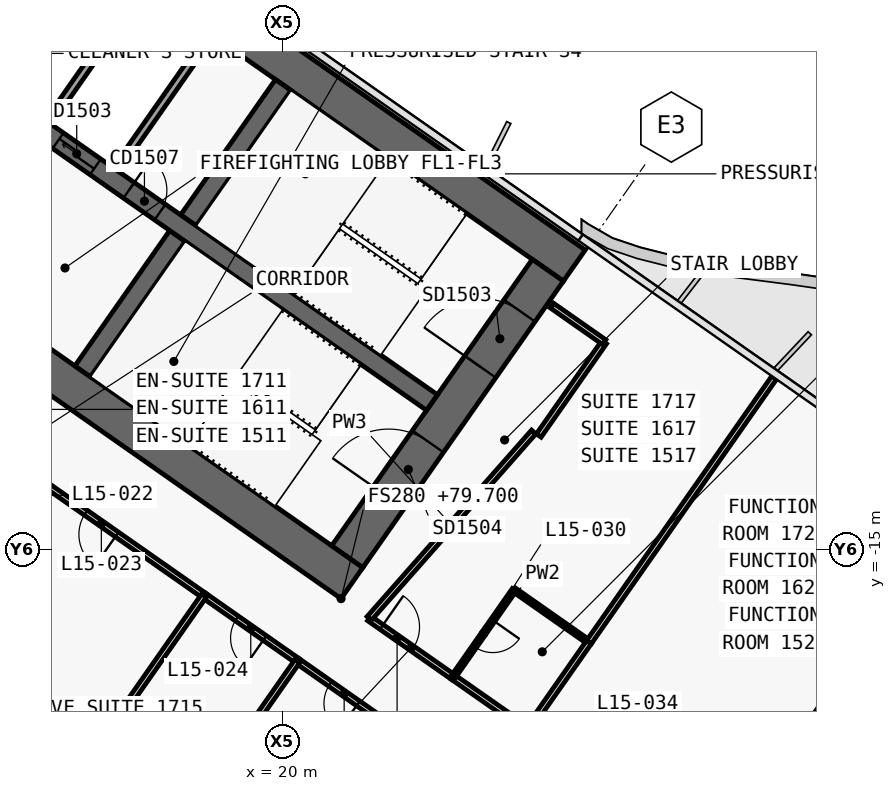
"""IFC4 building model, lengths in metres.
Left out: names, types, materials, properties, quantities, classifications, styles, units other than length and angle.
Written with IfcOpenShell. Run it as: python <this file> out.ifc"""

import sys

from ifc_helpers import new_model, si_unit, direction, frame, frame_2d, origin, place, context, subcontext, project, spatial, polyline, rectangle, outline, extrude, element, fill, save


model = new_model("IFC4")
c1 = context("Model", 3, precision=1e-05, world=origin(), true_north=direction((0.0, 1.0)))
c2 = subcontext(c1, "Body", "Model", "MODEL_VIEW")
j1 = project(units=[si_unit("LENGTHUNIT", "METRE"), si_unit("PLANEANGLEUNIT", "RADIAN")], contexts=[c1])
p1 = place(None, origin())
s1 = spatial("IfcSite", under=j1, at=p1, CompositionType="ELEMENT")
p2 = place(p1, origin())
s2 = spatial("IfcBuilding", under=s1, at=p2, CompositionType="ELEMENT")
p3 = place(p2, frame((0.0, 0.0, 79.7)))
s3 = spatial("IfcBuildingStorey", under=s2, at=p3, CompositionType="ELEMENT", Elevation=79.7)
p4 = place(p3, frame((-0.037, 11.867, 0.0), z_axis=(0.0, 0.0, 1.0), x_axis=(0.819155306259, -0.573571777746, 0.0)))
e1 = element("IfcWall", 1, at=p4, inside=s3, PredefinedType="SHEAR", context=c2, shape_type="SweptSolid", body=[
    extrude(outline(polyline([(33.837, 0.5), (0.0, 0.5), (0.7, -0.5), (33.837, -0.5), (33.837, 0.5)])), origin(), (0.0, 0.0, 1.0), 3.6),
])
p5 = place(p3, frame((-0.037, -0.585, 0.0), z_axis=(0.0, 0.0, 1.0), x_axis=(0.819157152511, -0.573569140985, 0.0)))
e2 = element("IfcWall", 2, at=p5, inside=s3, PredefinedType="SHEAR", context=c2, shape_type="SweptSolid", body=[
    extrude(outline(polyline([(26.695, 0.5), (0.0, 0.5), (0.7, -0.5), (26.695, -0.5), (26.695, 0.5)])), origin(), (0.0, 0.0, 1.0), 3.6),
])
p6 = place(p5, frame((1.245, 0.0, 0.0)))
e3 = element("IfcOpeningElement", 3, at=p6, cuts=e2, PredefinedType="OPENING", context=c2, shape_type="SweptSolid", body=[
    extrude(rectangle(XDim=1.5, YDim=2.1, at=frame_2d((0.75, 1.05))), frame((0.0, 0.51, 0.0), z_axis=(0.0, -1.0, 0.0), x_axis=(1.0, 0.0, 0.0)), (0.0, 0.0, 1.0), 1.02),
])
p7 = place(p5, frame((12.445, 0.0, 0.0)))
e4 = element("IfcOpeningElement", 4, at=p7, cuts=e2, PredefinedType="OPENING", context=c2, shape_type="SweptSolid", body=[
    extrude(rectangle(XDim=1.5, YDim=2.1, at=frame_2d((0.75, 1.05))), frame((0.0, 0.51, 0.0), z_axis=(0.0, -1.0, 0.0), x_axis=(1.0, 0.0, 0.0)), (0.0, 0.0, 1.0), 1.02),
])
p8 = place(p3, frame((21.708, -15.2, 0.0), z_axis=(0.0, 0.0, 1.0), x_axis=(0.573576324356, 0.819152122709, 0.0)))
e5 = element("IfcWall", 5, at=p8, inside=s3, PredefinedType="SHEAR", context=c2, shape_type="SweptSolid", body=[
    extrude(outline(polyline([(9.2, 0.5), (0.0, 0.5), (0.0, -0.5), (9.2, -0.5), (9.2, 0.5)])), origin(), (0.0, 0.0, 1.0), 3.6),
])
p9 = place(p8, frame((6.1, 0.0, 0.0)))
e6 = element("IfcOpeningElement", 6, at=p9, cuts=e5, PredefinedType="OPENING", context=c2, shape_type="SweptSolid", body=[
    extrude(rectangle(XDim=1.8, YDim=2.1, at=frame_2d((0.9, 1.05))), frame((0.0, 0.51, 0.0), z_axis=(0.0, -1.0, 0.0), x_axis=(1.0, 0.0, 0.0)), (0.0, 0.0, 1.0), 1.02),
])
p10 = place(p8, frame((1.9, 0.0, 0.0)))
e7 = element("IfcOpeningElement", 7, at=p10, cuts=e5, PredefinedType="OPENING", context=c2, shape_type="SweptSolid", body=[
    extrude(rectangle(XDim=1.8, YDim=2.1, at=frame_2d((0.9, 1.05))), frame((0.0, 0.51, 0.0), z_axis=(0.0, -1.0, 0.0), x_axis=(1.0, 0.0, 0.0)), (0.0, 0.0, 1.0), 1.02),
])
p11 = place(p3, frame((14.745, -10.324, 0.0), z_axis=(0.0, 0.0, 1.0), x_axis=(0.57356780395, 0.819158088694, 0.0)))
e8 = element("IfcWall", 8, at=p11, inside=s3, PredefinedType="SHEAR", context=c2, shape_type="SweptSolid", body=[
    extrude(outline(polyline([(0.0, 0.25), (0.0, -0.25), (4.35, -0.25), (4.35, 0.25), (0.0, 0.25)])), origin(), (0.0, 0.0, 1.0), 3.6),
])
p12 = place(p3, frame((17.527, -6.352, 0.0), z_axis=(0.0, 0.0, 1.0), x_axis=(0.573530143085, 0.819184457233, 0.0)))
e9 = element("IfcWall", 9, at=p12, inside=s3, PredefinedType="SHEAR", context=c2, shape_type="SweptSolid", body=[
    extrude(outline(polyline([(4.35, -0.25), (4.35, 0.25), (0.0, 0.25), (0.0, -0.25), (4.35, -0.25)])), origin(), (0.0, 0.0, 1.0), 3.6),
])
p13 = place(p3, frame((2.638, 3.768, 0.0), z_axis=(0.0, 0.0, 1.0), x_axis=(0.819148977158, -0.573580816643, 0.0)))
e10 = element("IfcWall", 10, at=p13, inside=s3, PredefinedType="SHEAR", context=c2, shape_type="SweptSolid", body=[
    extrude(outline(polyline([(0.0, 0.25), (0.0, -0.25), (26.0, -0.25), (26.0, 0.25), (0.0, 0.25)])), origin(), (0.0, 0.0, 1.0), 3.6),
])
p14 = place(p13, frame((9.637, 0.0, 0.0)))
e11 = element("IfcOpeningElement", 11, at=p14, cuts=e10, PredefinedType="OPENING", context=c2, shape_type="SweptSolid", body=[
    extrude(rectangle(XDim=1.2, YDim=2.1, at=frame_2d((0.6, 1.05))), frame((0.0, 0.26, 0.0), z_axis=(0.0, -1.0, 0.0), x_axis=(1.0, 0.0, 0.0)), (0.0, 0.0, 1.0), 0.52),
])
p15 = place(p13, frame((11.812, 0.0, 0.0)))
e12 = element("IfcOpeningElement", 12, at=p15, cuts=e10, PredefinedType="OPENING", context=c2, shape_type="SweptSolid", body=[
    extrude(rectangle(XDim=1.2, YDim=2.1, at=frame_2d((0.6, 1.05))), frame((0.0, 0.26, 0.0), z_axis=(0.0, -1.0, 0.0), x_axis=(1.0, 0.0, 0.0)), (0.0, 0.0, 1.0), 0.52),
])
p16 = place(p13, frame((13.988, 0.0, 0.0)))
e13 = element("IfcOpeningElement", 13, at=p16, cuts=e10, PredefinedType="OPENING", context=c2, shape_type="SweptSolid", body=[
    extrude(rectangle(XDim=1.2, YDim=2.1, at=frame_2d((0.6, 1.05))), frame((0.0, 0.26, 0.0), z_axis=(0.0, -1.0, 0.0), x_axis=(1.0, 0.0, 0.0)), (0.0, 0.0, 1.0), 0.52),
])
p17 = place(p13, frame((16.262, 0.0, 0.0)))
e14 = element("IfcOpeningElement", 14, at=p17, cuts=e10, PredefinedType="OPENING", context=c2, shape_type="SweptSolid", body=[
    extrude(rectangle(XDim=1.0, YDim=2.1, at=frame_2d((0.5, 1.05))), frame((0.0, 0.26, 0.0), z_axis=(0.0, -1.0, 0.0), x_axis=(1.0, 0.0, 0.0)), (0.0, 0.0, 1.0), 0.52),
])
p18 = place(p3, frame((12.059, -2.523, 0.0), z_axis=(0.0, 0.0, 1.0), x_axis=(0.573594173421, 0.819139624372, 0.0)))
e15 = element("IfcWall", 15, at=p18, inside=s3, PredefinedType="SOLIDWALL", context=c2, shape_type="SweptSolid", body=[
    extrude(rectangle(XDim=4.35, YDim=0.2, at=frame_2d((2.175, 0.0))), origin(), (0.0, 0.0, 1.0), 3.6),
])
p19 = place(p3, frame((13.84, -3.771, 0.0), z_axis=(0.0, 0.0, 1.0), x_axis=(0.57356780395, 0.819158088694, 0.0)))
e16 = element("IfcWall", 16, at=p19, inside=s3, PredefinedType="SOLIDWALL", context=c2, shape_type="SweptSolid", body=[
    extrude(rectangle(XDim=4.35, YDim=0.2, at=frame_2d((2.175, 0.0))), origin(), (0.0, 0.0, 1.0), 3.6),
])
p20 = place(p3, frame((15.622, -5.018, 0.0), z_axis=(0.0, 0.0, 1.0), x_axis=(0.573594173421, 0.819139624372, 0.0)))
e17 = element("IfcWall", 17, at=p20, inside=s3, PredefinedType="SOLIDWALL", context=c2, shape_type="SweptSolid", body=[
    extrude(rectangle(XDim=4.35, YDim=0.2, at=frame_2d((2.175, 0.0))), origin(), (0.0, 0.0, 1.0), 3.6),
])
p21 = place(p3, frame((22.284, -16.824, 0.0), z_axis=(0.0, 0.0, 1.0), x_axis=(0.819176640776, -0.573541307325, 0.0)))
e18 = element("IfcWall", 18, at=p21, inside=s3, PredefinedType="PARTITIONING", context=c2, shape_type="SweptSolid", body=[
    extrude(rectangle(XDim=2.698, YDim=0.15, at=frame_2d((1.349, 0.0))), origin(), (0.0, 0.0, 1.0), 3.32),
])
p22 = place(p21, frame((0.396, 0.0, 0.0)))
e19 = element("IfcOpeningElement", 19, at=p22, cuts=e18, PredefinedType="OPENING", context=c2, shape_type="SweptSolid", body=[
    extrude(rectangle(XDim=1.0, YDim=2.1, at=frame_2d((0.5, 1.05))), frame((0.0, 0.085, 0.0), z_axis=(0.0, -1.0, 0.0), x_axis=(1.0, 0.0, 0.0)), (0.0, 0.0, 1.0), 0.17),
])
p23 = place(p3, frame((24.491, -18.369, 0.0), z_axis=(0.0, 0.0, 1.0), x_axis=(0.819179439794, -0.573537309527, 0.0)))
e20 = element("IfcWall", 20, at=p23, inside=s3, PredefinedType="PARTITIONING", context=c2, shape_type="SweptSolid", body=[
    extrude(rectangle(XDim=2.404, YDim=0.15, at=frame_2d((1.202, 0.0))), origin(), (0.0, 0.0, 1.0), 3.32),
])
p24 = place(p3, frame((17.941, -16.224, 0.0), z_axis=(0.0, 0.0, 1.0), x_axis=(-0.819153746897, 0.573574004767, 0.0)))
e21 = element("IfcWall", 21, at=p24, inside=s3, PredefinedType="PARTITIONING", context=c2, shape_type="SweptSolid", body=[
    extrude(rectangle(XDim=6.603, YDim=0.15, at=frame_2d((3.302, 0.0))), origin(), (0.0, 0.0, 1.0), 2.6),
])
p25 = place(p24, frame((2.802, 0.0, 0.0)))
e22 = element("IfcOpeningElement", 22, at=p25, cuts=e21, PredefinedType="OPENING", context=c2, shape_type="SweptSolid", body=[
    extrude(rectangle(XDim=1.0, YDim=2.1, at=frame_2d((0.5, 1.05))), frame((0.0, 0.085, 0.0), z_axis=(0.0, -1.0, 0.0), x_axis=(1.0, 0.0, 0.0)), (0.0, 0.0, 1.0), 0.17),
])
p26 = place(p3, frame((20.398, -17.945, 0.0), z_axis=(0.0, 0.0, 1.0), x_axis=(-0.819128818764, 0.573609604409, 0.0)))
e23 = element("IfcWall", 23, at=p26, inside=s3, PredefinedType="PARTITIONING", context=c2, shape_type="SweptSolid", body=[
    extrude(rectangle(XDim=3.004, YDim=0.15, at=frame_2d((1.502, 0.0))), origin(), (0.0, 0.0, 1.0), 2.6),
])
p27 = place(p26, frame((1.052, 0.0, 0.0)))
e24 = element("IfcOpeningElement", 24, at=p27, cuts=e23, PredefinedType="OPENING", context=c2, shape_type="SweptSolid", body=[
    extrude(rectangle(XDim=0.9, YDim=2.1, at=frame_2d((0.45, 1.05))), frame((0.0, 0.085, 0.0), z_axis=(0.0, -1.0, 0.0), x_axis=(1.0, 0.0, 0.0)), (0.0, 0.0, 1.0), 0.17),
])
p28 = place(p3, frame((22.855, -19.666, 0.0), z_axis=(0.0, 0.0, 1.0), x_axis=(-0.819128818764, 0.573609604409, 0.0)))
e25 = element("IfcWall", 25, at=p28, inside=s3, PredefinedType="PARTITIONING", context=c2, shape_type="SweptSolid", body=[
    extrude(rectangle(XDim=3.004, YDim=0.15, at=frame_2d((1.502, 0.0))), origin(), (0.0, 0.0, 1.0), 2.6),
])
p29 = place(p28, frame((1.052, 0.0, 0.0)))
e26 = element("IfcOpeningElement", 26, at=p29, cuts=e25, PredefinedType="OPENING", context=c2, shape_type="SweptSolid", body=[
    extrude(rectangle(XDim=0.9, YDim=2.1, at=frame_2d((0.45, 1.05))), frame((0.0, 0.085, 0.0), z_axis=(0.0, -1.0, 0.0), x_axis=(1.0, 0.0, 0.0)), (0.0, 0.0, 1.0), 0.17),
])
p30 = place(p3, frame((26.098, -16.076, 0.0), z_axis=(0.0, 0.0, 1.0), x_axis=(-0.573550118428, -0.819170471667, 0.0)))
e27 = element("IfcWall", 27, at=p30, inside=s3, PredefinedType="PARTITIONING", context=c2, shape_type="SweptSolid", body=[
    extrude(rectangle(XDim=2.8, YDim=0.12, at=frame_2d((1.4, 0.0))), origin(), (0.0, 0.0, 1.0), 2.6),
])
p31 = place(p30, frame((0.975, 0.0, 0.0)))
e28 = element("IfcOpeningElement", 28, at=p31, cuts=e27, PredefinedType="OPENING", context=c2, shape_type="SweptSolid", body=[
    extrude(rectangle(XDim=0.85, YDim=2.05, at=frame_2d((0.425, 1.025))), frame((0.0, 0.07, 0.0), z_axis=(0.0, -1.0, 0.0), x_axis=(1.0, 0.0, 0.0)), (0.0, 0.0, 1.0), 0.14),
])
p32 = place(p3, frame((28.065, -17.453, 0.0), z_axis=(0.0, 0.0, 1.0), x_axis=(-0.819155442668, 0.573571582932, 0.0)))
e29 = element("IfcWall", 29, at=p32, inside=s3, PredefinedType="PARTITIONING", context=c2, shape_type="SweptSolid", body=[
    extrude(rectangle(XDim=2.4, YDim=0.12, at=frame_2d((1.2, 0.0))), origin(), (0.0, 0.0, 1.0), 3.32),
])
p33 = place(p3, frame((32.94, -10.491, 0.0), z_axis=(0.0, 0.0, 1.0), x_axis=(-0.573593433868, -0.819140142237, 0.0)))
e30 = element("IfcWall", 30, at=p33, inside=s3, PredefinedType="PARTITIONING", context=c2, shape_type="SweptSolid", body=[
    extrude(rectangle(XDim=8.499, YDim=0.15, at=frame_2d((4.25, 0.0))), origin(), (0.0, 0.0, 1.0), 2.6),
])
p34 = place(p3, frame((22.285, -16.825, 0.0), z_axis=(0.0, 0.0, 1.0), x_axis=(0.661551268245, 0.749899939647, 0.0)))
e31 = element("IfcWall", 31, at=p34, inside=s3, PredefinedType="PARTITIONING", context=c2, shape_type="SweptSolid", body=[
    extrude(rectangle(XDim=6.541, YDim=0.15, at=frame_2d((3.271, 0.0))), origin(), (0.0, 0.0, 1.0), 2.6),
])
p35 = place(p3, frame((26.746, -12.014, 0.0), z_axis=(0.0, 0.0, 1.0), x_axis=(0.573560650686, 0.819163097304, 0.0)))
e32 = element("IfcWall", 32, at=p35, inside=s3, PredefinedType="PARTITIONING", context=c2, shape_type="SweptSolid", body=[
    extrude(rectangle(XDim=3.0, YDim=0.15, at=frame_2d((1.5, 0.0))), origin(), (0.0, 0.0, 1.0), 3.32),
])
p36 = place(p3, frame((28.467, -9.556, 0.0), z_axis=(0.0, 0.0, 1.0), x_axis=(-0.819109000826, 0.573637903879, 0.0)))
e33 = element("IfcWall", 33, at=p36, inside=s3, PredefinedType="PARTITIONING", context=c2, shape_type="SweptSolid", body=[
    extrude(rectangle(XDim=1.68, YDim=0.15, at=frame_2d((0.84, 0.0))), origin(), (0.0, 0.0, 1.0), 3.32),
])
p37 = place(p3, frame((28.064, -17.454, 0.0), z_axis=(0.0, 0.0, 1.0), x_axis=(-0.573550118428, -0.819170471667, 0.0)))
e34 = element("IfcWall", 34, at=p37, inside=s3, PredefinedType="PARTITIONING", context=c2, shape_type="SweptSolid", body=[
    extrude(rectangle(XDim=2.8, YDim=0.15, at=frame_2d((1.4, 0.0))), origin(), (0.0, 0.0, 1.0), 2.6),
])
p38 = place(p3, frame((37.855, -13.932, 0.0), z_axis=(0.0, 0.0, 1.0), x_axis=(-0.573571089604, -0.819155788095, 0.0)))
e35 = element("IfcWall", 35, at=p38, inside=s3, PredefinedType="PARTITIONING", context=c2, shape_type="SweptSolid", body=[
    extrude(rectangle(XDim=11.3, YDim=0.15, at=frame_2d((5.65, 0.0))), origin(), (0.0, 0.0, 1.0), 2.5),
])
p39 = place(p3, frame((17.939, -16.223, 0.0), z_axis=(0.0, 0.0, 1.0), x_axis=(-0.573594765376, -0.819139209862, 0.0)))
e36 = element("IfcWall", 36, at=p39, inside=s3, PredefinedType="PARTITIONING", context=c2, shape_type="SweptSolid", body=[
    extrude(rectangle(XDim=7.3, YDim=0.15, at=frame_2d((3.65, 0.0))), origin(), (0.0, 0.0, 1.0), 2.5),
])
p40 = place(p3, frame((20.396, -17.944, 0.0), z_axis=(0.0, 0.0, 1.0), x_axis=(-0.57359826181, -0.819136761505, 0.0)))
e37 = element("IfcWall", 37, at=p40, inside=s3, PredefinedType="PARTITIONING", context=c2, shape_type="SweptSolid", body=[
    extrude(rectangle(XDim=6.63, YDim=0.15, at=frame_2d((3.315, 0.0))), origin(), (0.0, 0.0, 1.0), 2.6),
])
p41 = place(p16, origin())
e38 = element("IfcDoor", 38, at=p41, inside=s3, OperationType="SLIDING_TO_LEFT", PredefinedType="DOOR", context=c2, shape_type="SweptSolid", body=[
    extrude(rectangle(XDim=1.2, YDim=2.1, at=frame_2d((0.6, 1.05))), frame((0.0, 0.025, 0.0), z_axis=(0.0, -1.0, 0.0), x_axis=(1.0, 0.0, 0.0)), (0.0, 0.0, 1.0), 0.05),
])
fill(e13, e38)
p42 = place(p17, origin())
e39 = element("IfcDoor", 39, at=p42, inside=s3, OperationType="SINGLE_SWING_RIGHT", PredefinedType="DOOR", context=c2, shape_type="SweptSolid", body=[
    extrude(rectangle(XDim=1.0, YDim=2.1, at=frame_2d((0.5, 1.05))), frame((0.0, 0.025, 0.0), z_axis=(0.0, -1.0, 0.0), x_axis=(1.0, 0.0, 0.0)), (0.0, 0.0, 1.0), 0.05),
])
fill(e14, e39)
p43 = place(p9, origin())
e40 = element("IfcDoor", 40, at=p43, inside=s3, OperationType="DOUBLE_DOOR_SINGLE_SWING", PredefinedType="DOOR", context=c2, shape_type="SweptSolid", body=[
    extrude(rectangle(XDim=1.8, YDim=2.1, at=frame_2d((0.9, 1.05))), frame((0.0, 0.025, 0.0), z_axis=(0.0, -1.0, 0.0), x_axis=(1.0, 0.0, 0.0)), (0.0, 0.0, 1.0), 0.05),
])
fill(e6, e40)
p44 = place(p10, origin())
e41 = element("IfcDoor", 41, at=p44, inside=s3, OperationType="DOUBLE_DOOR_SINGLE_SWING", PredefinedType="DOOR", context=c2, shape_type="SweptSolid", body=[
    extrude(rectangle(XDim=1.8, YDim=2.1, at=frame_2d((0.9, 1.05))), frame((0.0, 0.025, 0.0), z_axis=(0.0, -1.0, 0.0), x_axis=(1.0, 0.0, 0.0)), (0.0, 0.0, 1.0), 0.05),
])
fill(e7, e41)
p45 = place(p25, origin())
e42 = element("IfcDoor", 42, at=p45, inside=s3, OperationType="SINGLE_SWING_RIGHT", PredefinedType="DOOR", context=c2, shape_type="SweptSolid", body=[
    extrude(rectangle(XDim=1.0, YDim=2.1, at=frame_2d((0.5, 1.05))), frame((0.0, 0.025, 0.0), z_axis=(0.0, -1.0, 0.0), x_axis=(1.0, 0.0, 0.0)), (0.0, 0.0, 1.0), 0.05),
])
fill(e22, e42)
p46 = place(p27, origin())
e43 = element("IfcDoor", 43, at=p46, inside=s3, OperationType="SINGLE_SWING_LEFT", PredefinedType="DOOR", context=c2, shape_type="SweptSolid", body=[
    extrude(rectangle(XDim=0.9, YDim=2.1, at=frame_2d((0.45, 1.05))), frame((0.0, 0.025, 0.0), z_axis=(0.0, -1.0, 0.0), x_axis=(1.0, 0.0, 0.0)), (0.0, 0.0, 1.0), 0.05),
])
fill(e24, e43)
p47 = place(p29, origin())
e44 = element("IfcDoor", 44, at=p47, inside=s3, OperationType="SINGLE_SWING_RIGHT", PredefinedType="DOOR", context=c2, shape_type="SweptSolid", body=[
    extrude(rectangle(XDim=0.9, YDim=2.1, at=frame_2d((0.45, 1.05))), frame((0.0, 0.025, 0.0), z_axis=(0.0, -1.0, 0.0), x_axis=(1.0, 0.0, 0.0)), (0.0, 0.0, 1.0), 0.05),
])
fill(e26, e44)
p48 = place(p31, origin())
e45 = element("IfcDoor", 45, at=p48, inside=s3, OperationType="SINGLE_SWING_RIGHT", PredefinedType="DOOR", context=c2, shape_type="SweptSolid", body=[
    extrude(rectangle(XDim=0.85, YDim=2.05, at=frame_2d((0.425, 1.025))), frame((0.0, 0.025, 0.0), z_axis=(0.0, -1.0, 0.0), x_axis=(1.0, 0.0, 0.0)), (0.0, 0.0, 1.0), 0.05),
])
fill(e28, e45)
p49 = place(p22, origin())
e46 = element("IfcDoor", 46, at=p49, inside=s3, OperationType="SINGLE_SWING_LEFT", PredefinedType="DOOR", context=c2, shape_type="SweptSolid", body=[
    extrude(rectangle(XDim=1.0, YDim=2.1, at=frame_2d((0.5, 1.05))), frame((0.0, 0.025, 0.0), z_axis=(0.0, -1.0, 0.0), x_axis=(1.0, 0.0, 0.0)), (0.0, 0.0, 1.0), 0.05),
])
fill(e19, e46)
save(model, sys.argv[1])
